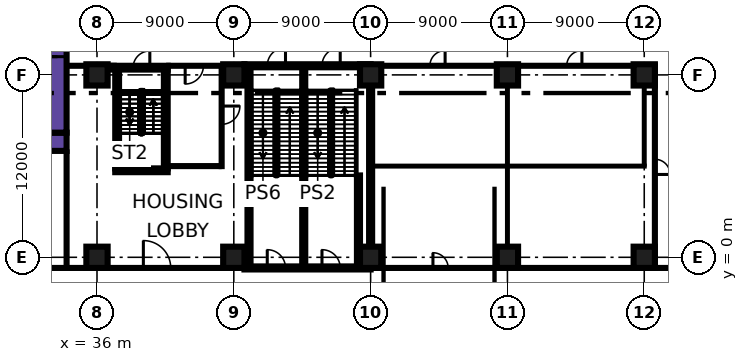
"""IFC4 building model, lengths in metres.
Left out: names, types, materials, properties, quantities, classifications, styles, units other than length and angle.
Written with IfcOpenShell. Run it as: python <this file> out.ifc"""

import sys

from ifc_helpers import new_model, si_unit, direction, frame, frame_2d, origin, origin_2d, place, context, subcontext, project, spatial, rectangle, extrude, element, fill, save


model = new_model("IFC4")
c1 = context("Model", 3, precision=1e-05, world=origin(), true_north=direction((0.0, 1.0)))
c2 = subcontext(c1, "Body", "Model", "MODEL_VIEW")
j1 = project(units=[si_unit("LENGTHUNIT", "METRE"), si_unit("PLANEANGLEUNIT", "RADIAN")], contexts=[c1])
p1 = place(None, origin())
s1 = spatial("IfcSite", under=j1, at=p1, CompositionType="ELEMENT")
p2 = place(p1, origin())
s2 = spatial("IfcBuilding", under=s1, at=p2, CompositionType="ELEMENT")
p3 = place(p2, origin())
s3 = spatial("IfcBuildingStorey", under=s2, at=p3, CompositionType="ELEMENT", Elevation=0.0)
for number, where, z_axis, x_axis in (
    (1, (36.0, 0.0, 0.0), (0.0, 0.0, 1.0), (1.0, 0.0, 0.0)),
    (2, (45.0, 0.0, 0.0), (0.0, 0.0, 1.0), (1.0, 0.0, 0.0)),
    (3, (54.0, 0.0, 0.0), (0.0, 0.0, 1.0), (1.0, 0.0, 0.0)),
    (4, (63.0, 0.0, 0.0), (0.0, 0.0, 1.0), (1.0, 0.0, 0.0)),
    (5, (72.0, 0.0, 0.0), (0.0, 0.0, 1.0), (1.0, 0.0, 0.0)),
    (6, (36.0, 12.0, 0.0), (0.0, 0.0, 1.0), (1.0, 0.0, 0.0)),
    (7, (45.0, 12.0, 0.0), (0.0, 0.0, 1.0), (1.0, 0.0, 0.0)),
    (8, (54.0, 12.0, 0.0), (0.0, 0.0, 1.0), (1.0, 0.0, 0.0)),
    (9, (63.0, 12.0, 0.0), (0.0, 0.0, 1.0), (1.0, 0.0, 0.0)),
    (10, (72.0, 12.0, 0.0), (0.0, 0.0, 1.0), (1.0, 0.0, 0.0)),
):
    element("IfcColumn", number, at=place(p3, frame(where, z_axis=z_axis, x_axis=x_axis)), inside=s3, PredefinedType="COLUMN", context=c2, shape_type="SweptSolid", body=[
        extrude(rectangle(XDim=1.4, YDim=1.4, at=origin_2d()), origin(), (0.0, 0.0, 1.0), 7.2),
    ])
p4 = place(p3, frame((9.0, 7.6, 0.0), z_axis=(0.0, 0.0, 1.0), x_axis=(1.0, 0.0, 0.0)))
e11 = element("IfcWall", 11, at=p4, inside=s3, PredefinedType="SHEAR", context=c2, shape_type="SweptSolid", body=[
    extrude(rectangle(XDim=25.0, YDim=1.2, at=frame_2d((12.5, 0.0))), origin(), (0.0, 0.0, 1.0), 7.2),
])
p5 = place(p3, frame((33.4, 8.2, 0.0), z_axis=(0.0, 0.0, 1.0), x_axis=(0.0, 1.0, 0.0)))
e12 = element("IfcWall", 12, at=p5, inside=s3, PredefinedType="SHEAR", context=c2, shape_type="SweptSolid", body=[
    extrude(rectangle(XDim=10.6, YDim=1.2, at=frame_2d((5.3, 0.0))), origin(), (0.0, 0.0, 1.0), 7.2),
])
p6 = place(p5, frame((5.0, 0.0, 0.0)))
e13 = element("IfcOpeningElement", 13, at=p6, cuts=e12, PredefinedType="OPENING", context=c2, shape_type="SweptSolid", body=[
    extrude(rectangle(XDim=1.8, YDim=2.4, at=frame_2d((0.9, 1.2))), frame((0.0, 0.61, 0.0), z_axis=(0.0, -1.0, 0.0), x_axis=(1.0, 0.0, 0.0)), (0.0, 0.0, 1.0), 1.22),
])
p7 = place(p3, frame((37.2, 5.725, 0.0), z_axis=(0.0, 0.0, 1.0), x_axis=(1.0, 0.0, 0.0)))
e14 = element("IfcWall", 14, at=p7, inside=s3, PredefinedType="SHEAR", context=c2, shape_type="SweptSolid", body=[
    extrude(rectangle(XDim=3.45, YDim=0.25, at=frame_2d((1.725, 0.0))), origin(), (0.0, 0.0, 1.0), 7.2),
])
p8 = place(p3, frame((36.7, 12.475, 0.0), z_axis=(0.0, 0.0, 1.0), x_axis=(1.0, 0.0, 0.0)))
e15 = element("IfcWall", 15, at=p8, inside=s3, PredefinedType="SHEAR", context=c2, shape_type="SweptSolid", body=[
    extrude(rectangle(XDim=3.95, YDim=0.25, at=frame_2d((1.975, 0.0))), origin(), (0.0, 0.0, 1.0), 7.2),
])
p9 = place(p8, frame((1.675, 0.0, 0.0)))
e16 = element("IfcOpeningElement", 16, at=p9, cuts=e15, PredefinedType="OPENING", context=c2, shape_type="SweptSolid", body=[
    extrude(rectangle(XDim=1.1, YDim=2.2, at=frame_2d((0.55, 1.1))), frame((0.0, 0.135, 0.0), z_axis=(0.0, -1.0, 0.0), x_axis=(1.0, 0.0, 0.0)), (0.0, 0.0, 1.0), 0.27),
])
for number, where, z_axis, x_axis in (
    (17, (37.325, 5.85, 0.0), (0.0, 0.0, 1.0), (0.0, 1.0, 0.0)),
    (18, (40.525, 5.85, 0.0), (0.0, 0.0, 1.0), (0.0, 1.0, 0.0)),
):
    element("IfcWall", number, at=place(p3, frame(where, z_axis=z_axis, x_axis=x_axis)), inside=s3, PredefinedType="SHEAR", context=c2, shape_type="SweptSolid", body=[
        extrude(rectangle(XDim=6.5, YDim=0.25, at=frame_2d((3.25, 0.0))), origin(), (0.0, 0.0, 1.0), 7.2),
    ])
p10 = place(p3, frame((-0.8, -0.7, 0.0), z_axis=(0.0, 0.0, 1.0), x_axis=(1.0, 0.0, 0.0)))
e19 = element("IfcWall", 19, at=p10, inside=s3, PredefinedType="PARTITIONING", context=c2, shape_type="SweptSolid", body=[
    extrude(rectangle(XDim=46.5, YDim=0.2, at=frame_2d((23.25, 0.0))), origin(), (0.0, 0.0, 1.0), 6.8),
])
p11 = place(p10, frame((39.85, 0.0, 0.0)))
e20 = element("IfcOpeningElement", 20, at=p11, cuts=e19, PredefinedType="OPENING", context=c2, shape_type="SweptSolid", body=[
    extrude(rectangle(XDim=1.8, YDim=2.1, at=frame_2d((0.9, 1.05))), frame((0.0, 0.11, 0.0), z_axis=(0.0, -1.0, 0.0), x_axis=(1.0, 0.0, 0.0)), (0.0, 0.0, 1.0), 0.22),
])
p12 = place(p10, frame((5.9, 0.0, 0.0)))
e21 = element("IfcOpeningElement", 21, at=p12, cuts=e19, PredefinedType="OPENING", context=c2, shape_type="SweptSolid", body=[
    extrude(rectangle(XDim=1.0, YDim=2.1, at=frame_2d((0.5, 1.05))), frame((0.0, 0.11, 0.0), z_axis=(0.0, -1.0, 0.0), x_axis=(1.0, 0.0, 0.0)), (0.0, 0.0, 1.0), 0.22),
])
p13 = place(p10, frame((10.9, 0.0, 0.0)))
e22 = element("IfcOpeningElement", 22, at=p13, cuts=e19, PredefinedType="OPENING", context=c2, shape_type="SweptSolid", body=[
    extrude(rectangle(XDim=1.0, YDim=2.1, at=frame_2d((0.5, 1.05))), frame((0.0, 0.11, 0.0), z_axis=(0.0, -1.0, 0.0), x_axis=(1.0, 0.0, 0.0)), (0.0, 0.0, 1.0), 0.22),
])
p14 = place(p10, frame((18.4, 0.0, 0.0)))
e23 = element("IfcOpeningElement", 23, at=p14, cuts=e19, PredefinedType="OPENING", context=c2, shape_type="SweptSolid", body=[
    extrude(rectangle(XDim=1.0, YDim=2.1, at=frame_2d((0.5, 1.05))), frame((0.0, 0.11, 0.0), z_axis=(0.0, -1.0, 0.0), x_axis=(1.0, 0.0, 0.0)), (0.0, 0.0, 1.0), 0.22),
])
p15 = place(p10, frame((29.4, 0.0, 0.0)))
e24 = element("IfcOpeningElement", 24, at=p15, cuts=e19, PredefinedType="OPENING", context=c2, shape_type="SweptSolid", body=[
    extrude(rectangle(XDim=1.0, YDim=2.1, at=frame_2d((0.5, 1.05))), frame((0.0, 0.11, 0.0), z_axis=(0.0, -1.0, 0.0), x_axis=(1.0, 0.0, 0.0)), (0.0, 0.0, 1.0), 0.22),
])
p16 = place(p3, frame((34.0, -0.6, 0.0), z_axis=(0.0, 0.0, 1.0), x_axis=(0.0, 1.0, 0.0)))
e25 = element("IfcWall", 25, at=p16, inside=s3, PredefinedType="PARTITIONING", context=c2, shape_type="SweptSolid", body=[
    extrude(rectangle(XDim=7.6, YDim=0.2, at=frame_2d((3.8, 0.0))), origin(), (0.0, 0.0, 1.0), 6.8),
])
p17 = place(p3, frame((34.0, 12.6, 0.0), z_axis=(0.0, 0.0, 1.0), x_axis=(1.0, 0.0, 0.0)))
e26 = element("IfcWall", 26, at=p17, inside=s3, PredefinedType="PARTITIONING", context=c2, shape_type="SweptSolid", body=[
    extrude(rectangle(XDim=3.2, YDim=0.2, at=frame_2d((1.6, 0.0))), origin(), (0.0, 0.0, 1.0), 6.8),
])
p18 = place(p3, frame((40.65, 6.0, 0.0), z_axis=(0.0, 0.0, 1.0), x_axis=(1.0, 0.0, 0.0)))
e27 = element("IfcWall", 27, at=p18, inside=s3, PredefinedType="PARTITIONING", context=c2, shape_type="SweptSolid", body=[
    extrude(rectangle(XDim=3.45, YDim=0.2, at=frame_2d((1.725, 0.0))), origin(), (0.0, 0.0, 1.0), 6.8),
])
p19 = place(p3, frame((40.65, 12.6, 0.0), z_axis=(0.0, 0.0, 1.0), x_axis=(1.0, 0.0, 0.0)))
e28 = element("IfcWall", 28, at=p19, inside=s3, PredefinedType="PARTITIONING", context=c2, shape_type="SweptSolid", body=[
    extrude(rectangle(XDim=5.05, YDim=0.2, at=frame_2d((2.525, 0.0))), origin(), (0.0, 0.0, 1.0), 6.8),
])
p20 = place(p19, frame((1.15, 0.0, 0.0)))
e29 = element("IfcOpeningElement", 29, at=p20, cuts=e28, PredefinedType="OPENING", context=c2, shape_type="SweptSolid", body=[
    extrude(rectangle(XDim=1.2, YDim=2.1, at=frame_2d((0.6, 1.05))), frame((0.0, 0.11, 0.0), z_axis=(0.0, -1.0, 0.0), x_axis=(1.0, 0.0, 0.0)), (0.0, 0.0, 1.0), 0.22),
])
p21 = place(p3, frame((44.2, 5.9, 0.0), z_axis=(0.0, 0.0, 1.0), x_axis=(0.0, 1.0, 0.0)))
e30 = element("IfcWall", 30, at=p21, inside=s3, PredefinedType="PARTITIONING", context=c2, shape_type="SweptSolid", body=[
    extrude(rectangle(XDim=6.6, YDim=0.2, at=frame_2d((3.3, 0.0))), origin(), (0.0, 0.0, 1.0), 6.8),
])
p22 = place(p21, frame((2.85, 0.0, 0.0)))
e31 = element("IfcOpeningElement", 31, at=p22, cuts=e30, PredefinedType="OPENING", context=c2, shape_type="SweptSolid", body=[
    extrude(rectangle(XDim=1.2, YDim=2.1, at=frame_2d((0.6, 1.05))), frame((0.0, 0.11, 0.0), z_axis=(0.0, -1.0, 0.0), x_axis=(1.0, 0.0, 0.0)), (0.0, 0.0, 1.0), 0.22),
])
p23 = place(p3, frame((45.7, -0.7, 0.0), z_axis=(0.0, 0.0, 1.0), x_axis=(1.0, 0.0, 0.0)))
e32 = element("IfcWall", 32, at=p23, inside=s3, PredefinedType="SOLIDWALL", context=c2, shape_type="SweptSolid", body=[
    extrude(rectangle(XDim=8.3, YDim=0.2, at=frame_2d((4.15, 0.0))), origin(), (0.0, 0.0, 1.0), 6.8),
])
p24 = place(p23, frame((5.1, 0.0, 0.0)))
e33 = element("IfcOpeningElement", 33, at=p24, cuts=e32, PredefinedType="OPENING", context=c2, shape_type="SweptSolid", body=[
    extrude(rectangle(XDim=1.2, YDim=2.1, at=frame_2d((0.6, 1.05))), frame((0.0, 0.11, 0.0), z_axis=(0.0, -1.0, 0.0), x_axis=(1.0, 0.0, 0.0)), (0.0, 0.0, 1.0), 0.22),
])
p25 = place(p23, frame((1.5, 0.0, 0.0)))
e34 = element("IfcOpeningElement", 34, at=p25, cuts=e32, PredefinedType="OPENING", context=c2, shape_type="SweptSolid", body=[
    extrude(rectangle(XDim=1.2, YDim=2.1, at=frame_2d((0.6, 1.05))), frame((0.0, 0.11, 0.0), z_axis=(0.0, -1.0, 0.0), x_axis=(1.0, 0.0, 0.0)), (0.0, 0.0, 1.0), 0.22),
])
p26 = place(p3, frame((46.0, -0.6, 0.0), z_axis=(0.0, 0.0, 1.0), x_axis=(0.0, 1.0, 0.0)))
e35 = element("IfcWall", 35, at=p26, inside=s3, PredefinedType="SOLIDWALL", context=c2, shape_type="SweptSolid", body=[
    extrude(rectangle(XDim=13.1, YDim=0.2, at=frame_2d((6.55, 0.0))), origin(), (0.0, 0.0, 1.0), 6.8),
])
p27 = place(p3, frame((45.7, 12.6, 0.0), z_axis=(0.0, 0.0, 1.0), x_axis=(1.0, 0.0, 0.0)))
e36 = element("IfcWall", 36, at=p27, inside=s3, PredefinedType="SOLIDWALL", context=c2, shape_type="SweptSolid", body=[
    extrude(rectangle(XDim=8.3, YDim=0.2, at=frame_2d((4.15, 0.0))), origin(), (0.0, 0.0, 1.0), 6.8),
])
p28 = place(p27, frame((5.1, 0.0, 0.0)))
e37 = element("IfcOpeningElement", 37, at=p28, cuts=e36, PredefinedType="OPENING", context=c2, shape_type="SweptSolid", body=[
    extrude(rectangle(XDim=1.2, YDim=2.1, at=frame_2d((0.6, 1.05))), frame((0.0, 0.11, 0.0), z_axis=(0.0, -1.0, 0.0), x_axis=(1.0, 0.0, 0.0)), (0.0, 0.0, 1.0), 0.22),
])
p29 = place(p27, frame((1.5, 0.0, 0.0)))
e38 = element("IfcOpeningElement", 38, at=p29, cuts=e36, PredefinedType="OPENING", context=c2, shape_type="SweptSolid", body=[
    extrude(rectangle(XDim=1.2, YDim=2.1, at=frame_2d((0.6, 1.05))), frame((0.0, 0.11, 0.0), z_axis=(0.0, -1.0, 0.0), x_axis=(1.0, 0.0, 0.0)), (0.0, 0.0, 1.0), 0.22),
])
p30 = place(p3, frame((49.6, -0.6, 0.0), z_axis=(0.0, 0.0, 1.0), x_axis=(0.0, 1.0, 0.0)))
e39 = element("IfcWall", 39, at=p30, inside=s3, PredefinedType="SOLIDWALL", context=c2, shape_type="SweptSolid", body=[
    extrude(rectangle(XDim=13.1, YDim=0.2, at=frame_2d((6.55, 0.0))), origin(), (0.0, 0.0, 1.0), 6.8),
])
p31 = place(p3, frame((54.0, -0.7, 0.0), z_axis=(0.0, 0.0, 1.0), x_axis=(1.0, 0.0, 0.0)))
e40 = element("IfcWall", 40, at=p31, inside=s3, PredefinedType="PARTITIONING", context=c2, shape_type="SweptSolid", body=[
    extrude(rectangle(XDim=21.0, YDim=0.2, at=frame_2d((10.5, 0.0))), origin(), (0.0, 0.0, 1.0), 6.8),
])
p32 = place(p31, frame((4.1, 0.0, 0.0)))
e41 = element("IfcOpeningElement", 41, at=p32, cuts=e40, PredefinedType="OPENING", context=c2, shape_type="SweptSolid", body=[
    extrude(rectangle(XDim=1.0, YDim=2.1, at=frame_2d((0.5, 1.05))), frame((0.0, 0.11, 0.0), z_axis=(0.0, -1.0, 0.0), x_axis=(1.0, 0.0, 0.0)), (0.0, 0.0, 1.0), 0.22),
])
p33 = place(p3, frame((54.0, -0.6, 0.0), z_axis=(0.0, 0.0, 1.0), x_axis=(0.0, 1.0, 0.0)))
e42 = element("IfcWall", 42, at=p33, inside=s3, PredefinedType="SOLIDWALL", context=c2, shape_type="SweptSolid", body=[
    extrude(rectangle(XDim=13.1, YDim=0.2, at=frame_2d((6.55, 0.0))), origin(), (0.0, 0.0, 1.0), 6.8),
])
p34 = place(p3, frame((54.0, 12.6, 0.0), z_axis=(0.0, 0.0, 1.0), x_axis=(1.0, 0.0, 0.0)))
e43 = element("IfcWall", 43, at=p34, inside=s3, PredefinedType="PARTITIONING", context=c2, shape_type="SweptSolid", body=[
    extrude(rectangle(XDim=18.8, YDim=0.2, at=frame_2d((9.4, 0.0))), origin(), (0.0, 0.0, 1.0), 6.8),
])
p35 = place(p34, frame((3.9, 0.0, 0.0)))
e44 = element("IfcOpeningElement", 44, at=p35, cuts=e43, PredefinedType="OPENING", context=c2, shape_type="SweptSolid", body=[
    extrude(rectangle(XDim=1.0, YDim=2.1, at=frame_2d((0.5, 1.05))), frame((0.0, 0.11, 0.0), z_axis=(0.0, -1.0, 0.0), x_axis=(1.0, 0.0, 0.0)), (0.0, 0.0, 1.0), 0.22),
])
p36 = place(p34, frame((12.9, 0.0, 0.0)))
e45 = element("IfcOpeningElement", 45, at=p36, cuts=e43, PredefinedType="OPENING", context=c2, shape_type="SweptSolid", body=[
    extrude(rectangle(XDim=1.0, YDim=2.1, at=frame_2d((0.5, 1.05))), frame((0.0, 0.11, 0.0), z_axis=(0.0, -1.0, 0.0), x_axis=(1.0, 0.0, 0.0)), (0.0, 0.0, 1.0), 0.22),
])
p37 = place(p3, frame((54.1, 6.0, 0.0), z_axis=(0.0, 0.0, 1.0), x_axis=(1.0, 0.0, 0.0)))
e46 = element("IfcWall", 46, at=p37, inside=s3, PredefinedType="PARTITIONING", context=c2, shape_type="SweptSolid", body=[
    extrude(rectangle(XDim=17.962, YDim=0.125, at=frame_2d((8.981, 0.0))), origin(), (0.0, 0.0, 1.0), 6.8),
])
p38 = place(p3, frame((63.0, -0.6, 0.0), z_axis=(0.0, 0.0, 1.0), x_axis=(0.0, 1.0, 0.0)))
e47 = element("IfcWall", 47, at=p38, inside=s3, PredefinedType="PARTITIONING", context=c2, shape_type="SweptSolid", body=[
    extrude(rectangle(XDim=6.538, YDim=0.125, at=frame_2d((3.269, 0.0))), origin(), (0.0, 0.0, 1.0), 6.8),
])
for number, where, z_axis, x_axis in (
    (48, (63.0, 6.062, 0.0), (0.0, 0.0, 1.0), (0.0, 1.0, 0.0)),
    (49, (72.0, 6.062, 0.0), (0.0, 0.0, 1.0), (0.0, 1.0, 0.0)),
):
    element("IfcWall", number, at=place(p3, frame(where, z_axis=z_axis, x_axis=x_axis)), inside=s3, PredefinedType="PARTITIONING", context=c2, shape_type="SweptSolid", body=[
        extrude(rectangle(XDim=6.438, YDim=0.125, at=frame_2d((3.219, 0.0))), origin(), (0.0, 0.0, 1.0), 6.8),
    ])
p39 = place(p3, frame((72.7, -0.6, 0.0), z_axis=(0.0, 0.0, 1.0), x_axis=(0.0, 1.0, 0.0)))
e50 = element("IfcWall", 50, at=p39, inside=s3, PredefinedType="PARTITIONING", context=c2, shape_type="SweptSolid", body=[
    extrude(rectangle(XDim=13.1, YDim=0.2, at=frame_2d((6.55, 0.0))), origin(), (0.0, 0.0, 1.0), 6.8),
])
p40 = place(p39, frame((6.05, 0.0, 0.0)))
e51 = element("IfcOpeningElement", 51, at=p40, cuts=e50, PredefinedType="OPENING", context=c2, shape_type="SweptSolid", body=[
    extrude(rectangle(XDim=1.0, YDim=2.1, at=frame_2d((0.5, 1.05))), frame((0.0, 0.11, 0.0), z_axis=(0.0, -1.0, 0.0), x_axis=(1.0, 0.0, 0.0)), (0.0, 0.0, 1.0), 0.22),
])
p41 = place(p3, frame((53.2, -0.6, 0.0), z_axis=(0.0, 0.0, 1.0), x_axis=(0.0, 1.0, 0.0)))
e52 = element("IfcWall", 52, at=p41, inside=s3, PredefinedType="SOLIDWALL", context=c2, shape_type="SweptSolid", body=[
    extrude(rectangle(XDim=5.985, YDim=0.2, at=frame_2d((2.993, 0.0))), origin(), (0.0, 0.0, 1.0), 6.8),
])
p42 = place(p6, origin())
e53 = element("IfcDoor", 53, at=p42, inside=s3, OperationType="DOUBLE_DOOR_SINGLE_SWING", PredefinedType="DOOR", context=c2, shape_type="SweptSolid", body=[
    extrude(rectangle(XDim=1.8, YDim=2.4, at=frame_2d((0.9, 1.2))), frame((0.0, 0.025, 0.0), z_axis=(0.0, -1.0, 0.0), x_axis=(1.0, 0.0, 0.0)), (0.0, 0.0, 1.0), 0.05),
])
fill(e13, e53)
p43 = place(p9, frame((1.1, 0.0, 0.0), z_axis=(0.0, 0.0, 1.0), x_axis=(-1.0, 0.0, 0.0)))
e54 = element("IfcDoor", 54, at=p43, inside=s3, OperationType="SINGLE_SWING_RIGHT", PredefinedType="DOOR", context=c2, shape_type="SweptSolid", body=[
    extrude(rectangle(XDim=1.1, YDim=2.2, at=frame_2d((0.55, 1.1))), frame((0.0, 0.025, 0.0), z_axis=(0.0, -1.0, 0.0), x_axis=(1.0, 0.0, 0.0)), (0.0, 0.0, 1.0), 0.05),
])
fill(e16, e54)
p44 = place(p35, frame((1.0, 0.0, 0.0), z_axis=(0.0, 0.0, 1.0), x_axis=(-1.0, 0.0, 0.0)))
e55 = element("IfcDoor", 55, at=p44, inside=s3, OperationType="SINGLE_SWING_RIGHT", PredefinedType="DOOR", context=c2, shape_type="SweptSolid", body=[
    extrude(rectangle(XDim=1.0, YDim=2.1, at=frame_2d((0.5, 1.05))), frame((0.0, 0.025, 0.0), z_axis=(0.0, -1.0, 0.0), x_axis=(1.0, 0.0, 0.0)), (0.0, 0.0, 1.0), 0.05),
])
fill(e44, e55)
p45 = place(p36, frame((1.0, 0.0, 0.0), z_axis=(0.0, 0.0, 1.0), x_axis=(-1.0, 0.0, 0.0)))
e56 = element("IfcDoor", 56, at=p45, inside=s3, OperationType="SINGLE_SWING_RIGHT", PredefinedType="DOOR", context=c2, shape_type="SweptSolid", body=[
    extrude(rectangle(XDim=1.0, YDim=2.1, at=frame_2d((0.5, 1.05))), frame((0.0, 0.025, 0.0), z_axis=(0.0, -1.0, 0.0), x_axis=(1.0, 0.0, 0.0)), (0.0, 0.0, 1.0), 0.05),
])
fill(e45, e56)
p46 = place(p32, origin())
e57 = element("IfcDoor", 57, at=p46, inside=s3, OperationType="SINGLE_SWING_LEFT", PredefinedType="DOOR", context=c2, shape_type="SweptSolid", body=[
    extrude(rectangle(XDim=1.0, YDim=2.1, at=frame_2d((0.5, 1.05))), frame((0.0, 0.025, 0.0), z_axis=(0.0, -1.0, 0.0), x_axis=(1.0, 0.0, 0.0)), (0.0, 0.0, 1.0), 0.05),
])
fill(e41, e57)
p47 = place(p40, frame((1.0, 0.0, 0.0), z_axis=(0.0, 0.0, 1.0), x_axis=(-1.0, 0.0, 0.0)))
e58 = element("IfcDoor", 58, at=p47, inside=s3, OperationType="SINGLE_SWING_LEFT", PredefinedType="DOOR", context=c2, shape_type="SweptSolid", body=[
    extrude(rectangle(XDim=1.0, YDim=2.1, at=frame_2d((0.5, 1.05))), frame((0.0, 0.025, 0.0), z_axis=(0.0, -1.0, 0.0), x_axis=(1.0, 0.0, 0.0)), (0.0, 0.0, 1.0), 0.05),
])
fill(e51, e58)
p48 = place(p22, origin())
e59 = element("IfcDoor", 59, at=p48, inside=s3, OperationType="SINGLE_SWING_RIGHT", PredefinedType="DOOR", context=c2, shape_type="SweptSolid", body=[
    extrude(rectangle(XDim=1.2, YDim=2.1, at=frame_2d((0.6, 1.05))), frame((0.0, 0.025, 0.0), z_axis=(0.0, -1.0, 0.0), x_axis=(1.0, 0.0, 0.0)), (0.0, 0.0, 1.0), 0.05),
])
fill(e31, e59)
p49 = place(p20, frame((1.2, 0.0, 0.0), z_axis=(0.0, 0.0, 1.0), x_axis=(-1.0, 0.0, 0.0)))
e60 = element("IfcDoor", 60, at=p49, inside=s3, OperationType="SINGLE_SWING_LEFT", PredefinedType="DOOR", context=c2, shape_type="SweptSolid", body=[
    extrude(rectangle(XDim=1.2, YDim=2.1, at=frame_2d((0.6, 1.05))), frame((0.0, 0.025, 0.0), z_axis=(0.0, -1.0, 0.0), x_axis=(1.0, 0.0, 0.0)), (0.0, 0.0, 1.0), 0.05),
])
fill(e29, e60)
p50 = place(p11, origin())
e61 = element("IfcDoor", 61, at=p50, inside=s3, OperationType="DOUBLE_DOOR_SINGLE_SWING", PredefinedType="DOOR", context=c2, shape_type="SweptSolid", body=[
    extrude(rectangle(XDim=1.8, YDim=2.1, at=frame_2d((0.9, 1.05))), frame((0.0, 0.025, 0.0), z_axis=(0.0, -1.0, 0.0), x_axis=(1.0, 0.0, 0.0)), (0.0, 0.0, 1.0), 0.05),
])
fill(e20, e61)
p51 = place(p28, frame((1.2, 0.0, 0.0), z_axis=(0.0, 0.0, 1.0), x_axis=(-1.0, 0.0, 0.0)))
e62 = element("IfcDoor", 62, at=p51, inside=s3, OperationType="SINGLE_SWING_RIGHT", PredefinedType="DOOR", context=c2, shape_type="SweptSolid", body=[
    extrude(rectangle(XDim=1.2, YDim=2.1, at=frame_2d((0.6, 1.05))), frame((0.0, 0.025, 0.0), z_axis=(0.0, -1.0, 0.0), x_axis=(1.0, 0.0, 0.0)), (0.0, 0.0, 1.0), 0.05),
])
fill(e37, e62)
p52 = place(p24, origin())
e63 = element("IfcDoor", 63, at=p52, inside=s3, OperationType="SINGLE_SWING_LEFT", PredefinedType="DOOR", context=c2, shape_type="SweptSolid", body=[
    extrude(rectangle(XDim=1.2, YDim=2.1, at=frame_2d((0.6, 1.05))), frame((0.0, 0.025, 0.0), z_axis=(0.0, -1.0, 0.0), x_axis=(1.0, 0.0, 0.0)), (0.0, 0.0, 1.0), 0.05),
])
fill(e33, e63)
p53 = place(p29, frame((1.2, 0.0, 0.0), z_axis=(0.0, 0.0, 1.0), x_axis=(-1.0, 0.0, 0.0)))
e64 = element("IfcDoor", 64, at=p53, inside=s3, OperationType="SINGLE_SWING_RIGHT", PredefinedType="DOOR", context=c2, shape_type="SweptSolid", body=[
    extrude(rectangle(XDim=1.2, YDim=2.1, at=frame_2d((0.6, 1.05))), frame((0.0, 0.025, 0.0), z_axis=(0.0, -1.0, 0.0), x_axis=(1.0, 0.0, 0.0)), (0.0, 0.0, 1.0), 0.05),
])
fill(e38, e64)
p54 = place(p25, origin())
e65 = element("IfcDoor", 65, at=p54, inside=s3, OperationType="SINGLE_SWING_LEFT", PredefinedType="DOOR", context=c2, shape_type="SweptSolid", body=[
    extrude(rectangle(XDim=1.2, YDim=2.1, at=frame_2d((0.6, 1.05))), frame((0.0, 0.025, 0.0), z_axis=(0.0, -1.0, 0.0), x_axis=(1.0, 0.0, 0.0)), (0.0, 0.0, 1.0), 0.05),
])
fill(e34, e65)
save(model, sys.argv[1])
